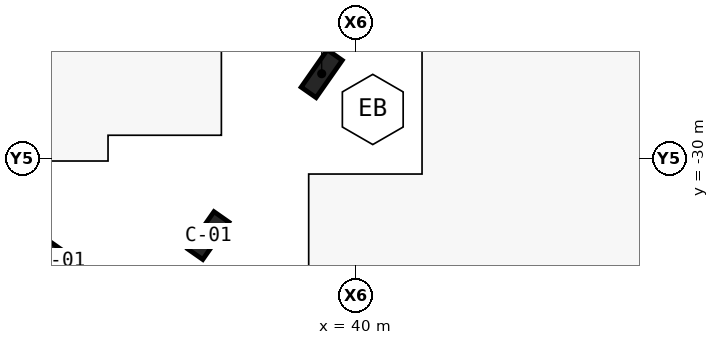
"""IFC4 building model, lengths in metres.
Left out: names, types, materials, properties, quantities, classifications, styles, units other than length and angle.
Written with IfcOpenShell. Run it as: python <this file> out.ifc"""

import sys

from ifc_helpers import new_model, si_unit, direction, frame, origin, origin_2d, place, context, subcontext, project, spatial, rectangle, extrude, element, save


model = new_model("IFC4")
c1 = context("Model", 3, precision=1e-05, world=origin(), true_north=direction((0.0, 1.0)))
c2 = subcontext(c1, "Body", "Model", "MODEL_VIEW")
j1 = project(units=[si_unit("LENGTHUNIT", "METRE"), si_unit("PLANEANGLEUNIT", "RADIAN")], contexts=[c1])
p1 = place(None, origin())
s1 = spatial("IfcSite", under=j1, at=p1, CompositionType="ELEMENT")
p2 = place(p1, origin())
s2 = spatial("IfcBuilding", under=s1, at=p2, CompositionType="ELEMENT")
p3 = place(p2, frame((0.0, 0.0, -9.0)))
s3 = spatial("IfcBuildingStorey", under=s2, at=p3, CompositionType="ELEMENT", Elevation=-9.0)
for number, where, z_axis, x_axis in (
    (1, (30.336, -33.388, 0.0), (0.0, 0.0, 1.0), (0.819, -0.574, 0.0)),
    (2, (35.14, -32.541, 0.0), (0.0, 0.0, 1.0), (0.574, 0.819, 0.0)),
    (3, (38.869, -27.216, 0.0), (0.0, 0.0, 1.0), (0.574, 0.819, 0.0)),
):
    element("IfcColumn", number, at=place(p3, frame(where, z_axis=z_axis, x_axis=x_axis)), inside=s3, PredefinedType="COLUMN", context=c2, shape_type="SweptSolid", body=[
        extrude(rectangle(XDim=1.5, YDim=0.6, at=origin_2d()), origin(), (0.0, 0.0, 1.0), 4.5),
    ])
save(model, sys.argv[1])
